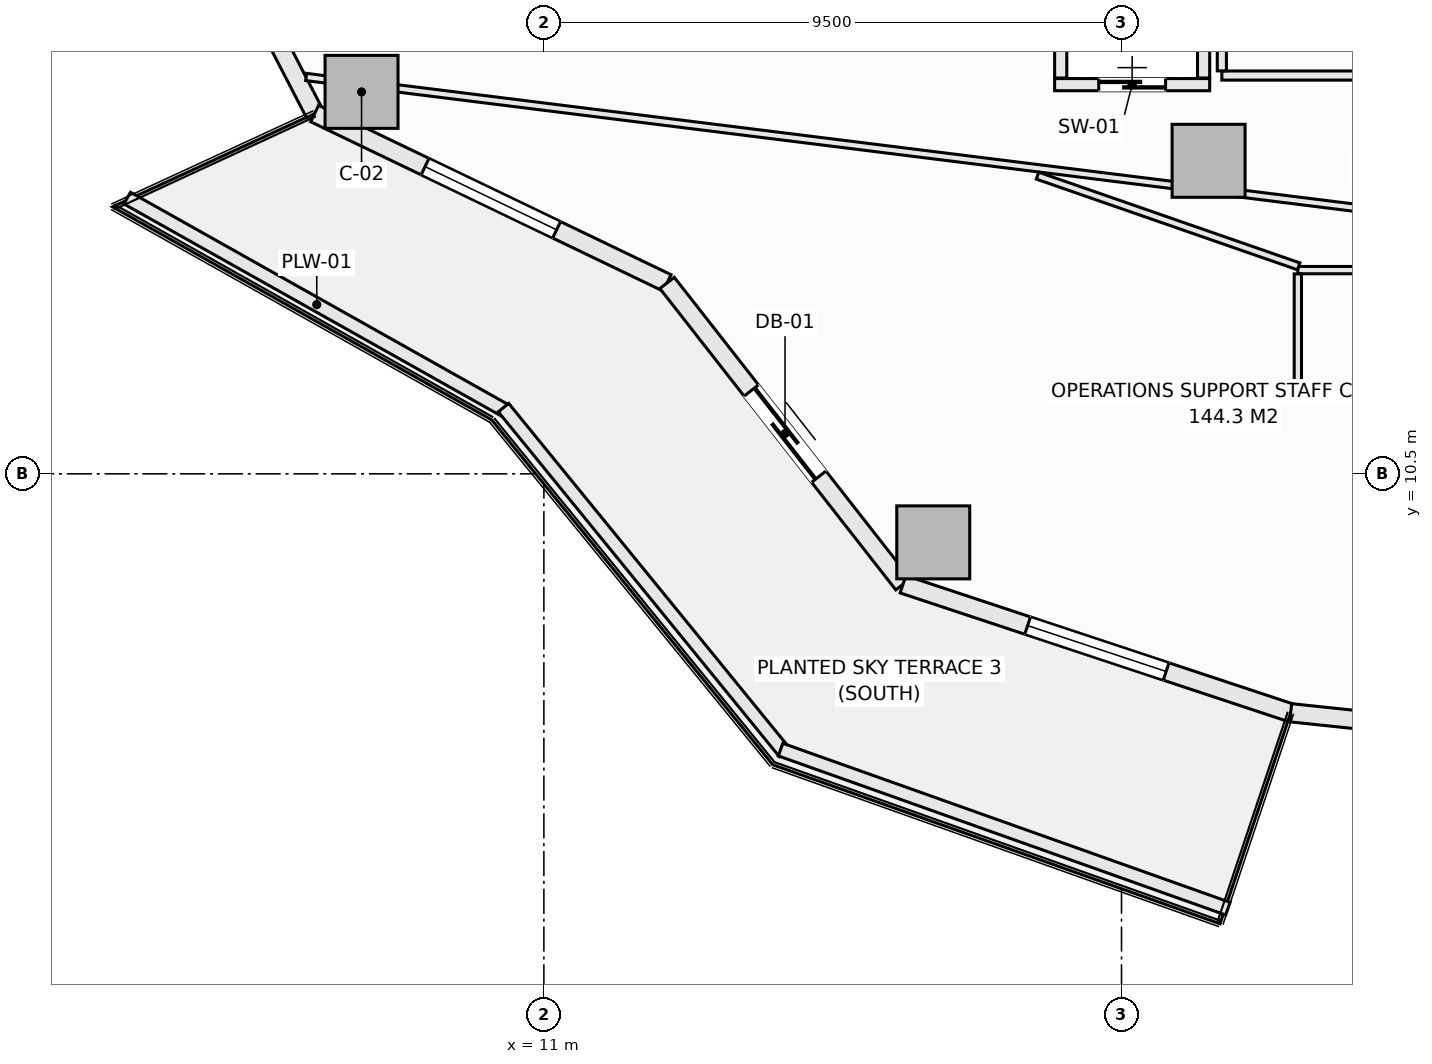
"""IFC4 building model, lengths in metres.
Left out: names, types, materials, properties, quantities, classifications, styles, units other than length and angle.
Written with IfcOpenShell. Run it as: python <this file> out.ifc"""

import sys

from ifc_helpers import new_model, si_unit, direction, frame, frame_2d, origin, origin_2d, place, context, subcontext, project, spatial, rectangle, extrude, element, fill, save


model = new_model("IFC4")
c1 = context("Model", 3, precision=1e-05, world=origin(), true_north=direction((0.0, 1.0)))
c2 = subcontext(c1, "Body", "Model", "MODEL_VIEW")
j1 = project(units=[si_unit("LENGTHUNIT", "METRE"), si_unit("PLANEANGLEUNIT", "RADIAN")], contexts=[c1])
p1 = place(None, origin())
s1 = spatial("IfcSite", under=j1, at=p1, CompositionType="ELEMENT")
p2 = place(p1, origin())
s2 = spatial("IfcBuilding", under=s1, at=p2, CompositionType="ELEMENT")
p3 = place(p2, frame((0.0, 0.0, 84.25)))
s3 = spatial("IfcBuildingStorey", under=s2, at=p3, CompositionType="ELEMENT", Elevation=84.25)
for number, where, z_axis, x_axis in (
    (1, (8.001, 16.781, -0.28), (0.0, 0.0, 1.0), (1.0, 0.0, 0.0)),
    (2, (17.404, 9.373, -0.28), (0.0, 0.0, 1.0), (1.0, 0.0, 0.0)),
    (3, (21.932, 15.648, -0.28), (0.0, 0.0, 1.0), (1.0, 0.0, 0.0)),
):
    element("IfcColumn", number, at=place(p3, frame(where, z_axis=z_axis, x_axis=x_axis)), inside=s3, PredefinedType="COLUMN", context=c2, shape_type="SweptSolid", body=[
        extrude(rectangle(XDim=1.2, YDim=1.2, at=origin_2d()), origin(), (0.0, 0.0, 1.0), 3.85),
    ])
p4 = place(p3, frame((4.588, 21.526, 0.0), z_axis=(0.0, 0.0, 1.0), x_axis=(0.459800981414, -0.888021991558, 0.0)))
e4 = element("IfcWall", 4, at=p4, inside=s3, PredefinedType="SOLIDWALL", context=c2, shape_type="SweptSolid", body=[
    extrude(rectangle(XDim=5.744, YDim=0.3, at=frame_2d((2.872, 0.0))), origin(), (0.0, 0.0, 1.0), 3.093),
])
p5 = place(p4, frame((1.672, 0.0, 0.85)))
e5 = element("IfcOpeningElement", 5, at=p5, cuts=e4, PredefinedType="OPENING", context=c2, shape_type="SweptSolid", body=[
    extrude(rectangle(XDim=2.4, YDim=1.9, at=frame_2d((1.2, 0.95))), frame((0.0, 0.16, 0.0), z_axis=(0.0, -1.0, 0.0), x_axis=(1.0, 0.0, 0.0)), (0.0, 0.0, 1.0), 0.32),
])
p6 = place(p3, frame((7.229, 16.425, 0.0), z_axis=(0.0, 0.0, 1.0), x_axis=(0.901354747727, -0.433081538224, 0.0)))
e6 = element("IfcWall", 6, at=p6, inside=s3, PredefinedType="SOLIDWALL", context=c2, shape_type="SweptSolid", body=[
    extrude(rectangle(XDim=6.431, YDim=0.3, at=frame_2d((3.215, 0.0))), origin(), (0.0, 0.0, 1.0), 3.093),
])
p7 = place(p6, frame((2.015, 0.0, 0.85)))
e7 = element("IfcOpeningElement", 7, at=p7, cuts=e6, PredefinedType="OPENING", context=c2, shape_type="SweptSolid", body=[
    extrude(rectangle(XDim=2.4, YDim=1.9, at=frame_2d((1.2, 0.95))), frame((0.0, 0.16, 0.0), z_axis=(0.0, -1.0, 0.0), x_axis=(1.0, 0.0, 0.0)), (0.0, 0.0, 1.0), 0.32),
])
p8 = place(p3, frame((13.026, 13.64, 0.0), z_axis=(0.0, 0.0, 1.0), x_axis=(0.616434798832, -0.78740595552, 0.0)))
e8 = element("IfcWall", 8, at=p8, inside=s3, PredefinedType="SOLIDWALL", context=c2, shape_type="SweptSolid", body=[
    extrude(rectangle(XDim=6.294, YDim=0.3, at=frame_2d((3.147, 0.0))), origin(), (0.0, 0.0, 1.0), 3.093),
])
p9 = place(p8, frame((2.247, 0.0, 0.0)))
e9 = element("IfcOpeningElement", 9, at=p9, cuts=e8, PredefinedType="OPENING", context=c2, shape_type="SweptSolid", body=[
    extrude(rectangle(XDim=1.8, YDim=2.25, at=frame_2d((0.9, 1.125))), frame((0.0, 0.16, 0.0), z_axis=(0.0, -1.0, 0.0), x_axis=(1.0, 0.0, 0.0)), (0.0, 0.0, 1.0), 0.32),
])
p10 = place(p3, frame((16.906, 8.684, 0.0), z_axis=(0.0, 0.0, 1.0), x_axis=(0.949245153629, -0.314537181127, 0.0)))
e10 = element("IfcWall", 10, at=p10, inside=s3, PredefinedType="SOLIDWALL", context=c2, shape_type="SweptSolid", body=[
    extrude(rectangle(XDim=6.717, YDim=0.3, at=frame_2d((3.358, 0.0))), origin(), (0.0, 0.0, 1.0), 3.093),
])
p11 = place(p10, frame((2.159, 0.0, 0.85)))
e11 = element("IfcOpeningElement", 11, at=p11, cuts=e10, PredefinedType="OPENING", context=c2, shape_type="SweptSolid", body=[
    extrude(rectangle(XDim=2.4, YDim=1.9, at=frame_2d((1.2, 0.95))), frame((0.0, 0.16, 0.0), z_axis=(0.0, -1.0, 0.0), x_axis=(1.0, 0.0, 0.0)), (0.0, 0.0, 1.0), 0.32),
])
p12 = place(p3, frame((23.282, 6.571, 0.0), z_axis=(0.0, 0.0, 1.0), x_axis=(0.994498840295, -0.104747585419, 0.0)))
e12 = element("IfcWall", 12, at=p12, inside=s3, PredefinedType="SOLIDWALL", context=c2, shape_type="SweptSolid", body=[
    extrude(rectangle(XDim=6.88, YDim=0.3, at=frame_2d((3.44, 0.0))), origin(), (0.0, 0.0, 1.0), 3.093),
])
p13 = place(p12, frame((2.24, 0.0, 0.85)))
e13 = element("IfcOpeningElement", 13, at=p13, cuts=e12, PredefinedType="OPENING", context=c2, shape_type="SweptSolid", body=[
    extrude(rectangle(XDim=2.4, YDim=1.9, at=frame_2d((1.2, 0.95))), frame((0.0, 0.16, 0.0), z_axis=(0.0, -1.0, 0.0), x_axis=(1.0, 0.0, 0.0)), (0.0, 0.0, 1.0), 0.32),
])
p14 = place(p3, frame((4.147, 15.034, 0.0), z_axis=(0.0, 0.0, 1.0), x_axis=(0.871775109335, -0.489906275468, 0.0)))
e14 = element("IfcWall", 14, at=p14, inside=s3, PredefinedType="PARAPET", context=c2, shape_type="SweptSolid", body=[
    extrude(rectangle(XDim=7.152, YDim=0.22, at=frame_2d((3.576, 0.0))), origin(), (0.0, 0.0, 1.0), 0.52),
])
p15 = place(p3, frame((10.336, 11.589, 0.0), z_axis=(0.0, 0.0, 1.0), x_axis=(0.631819273026, -0.775115737315, 0.0)))
e15 = element("IfcWall", 15, at=p15, inside=s3, PredefinedType="PARAPET", context=c2, shape_type="SweptSolid", body=[
    extrude(rectangle(XDim=7.316, YDim=0.22, at=frame_2d((3.658, 0.0))), origin(), (0.0, 0.0, 1.0), 0.52),
])
p16 = place(p3, frame((14.893, 5.965, 0.0), z_axis=(0.0, 0.0, 1.0), x_axis=(0.942203722205, -0.335040513764, 0.0)))
e16 = element("IfcWall", 16, at=p16, inside=s3, PredefinedType="PARAPET", context=c2, shape_type="SweptSolid", body=[
    extrude(rectangle(XDim=7.807, YDim=0.22, at=frame_2d((3.904, 0.0))), origin(), (0.0, 0.0, 1.0), 0.52),
])
p17 = place(p3, frame((19.4, 16.9, 0.0), z_axis=(0.0, 0.0, 1.0), x_axis=(1.0, 0.0, 0.0)))
e17 = element("IfcWall", 17, at=p17, inside=s3, PredefinedType="SOLIDWALL", context=c2, shape_type="SweptSolid", body=[
    extrude(rectangle(XDim=2.55, YDim=0.2, at=frame_2d((1.275, 0.0))), origin(), (0.0, 0.0, 1.0), 3.57),
])
p18 = place(p17, frame((0.725, 0.0, 0.0)))
e18 = element("IfcOpeningElement", 18, at=p18, cuts=e17, PredefinedType="OPENING", context=c2, shape_type="SweptSolid", body=[
    extrude(rectangle(XDim=1.1, YDim=2.2, at=frame_2d((0.55, 1.1))), frame((0.0, 0.11, 0.0), z_axis=(0.0, -1.0, 0.0), x_axis=(1.0, 0.0, 0.0)), (0.0, 0.0, 1.0), 0.22),
])
for number, where, z_axis, x_axis in (
    (19, (19.5, 17.01, 0.0), (0.0, 0.0, 1.0), (0.0, 1.0, 0.0)),
    (20, (21.85, 17.01, 0.0), (0.0, 0.0, 1.0), (0.0, 1.0, 0.0)),
):
    element("IfcWall", number, at=place(p3, frame(where, z_axis=z_axis, x_axis=x_axis)), inside=s3, PredefinedType="SOLIDWALL", context=c2, shape_type="SweptSolid", body=[
        extrude(rectangle(XDim=2.53, YDim=0.2, at=frame_2d((1.265, 0.0))), origin(), (0.0, 0.0, 1.0), 3.57),
    ])
p19 = place(p3, frame((22.15, 17.05, 0.0), z_axis=(0.0, 0.0, 1.0), x_axis=(1.0, 0.0, 0.0)))
e21 = element("IfcWall", 21, at=p19, inside=s3, PredefinedType="PARTITIONING", context=c2, shape_type="SweptSolid", body=[
    extrude(rectangle(XDim=5.0, YDim=0.15, at=frame_2d((2.5, 0.0))), origin(), (0.0, 0.0, 1.0), 3.57),
])
p20 = place(p3, frame((22.15, 17.127, 0.0), z_axis=(0.0, 0.0, 1.0), x_axis=(0.0, 1.0, 0.0)))
e22 = element("IfcWall", 22, at=p20, inside=s3, PredefinedType="PARTITIONING", context=c2, shape_type="SweptSolid", body=[
    extrude(rectangle(XDim=2.521, YDim=0.15, at=frame_2d((1.26, 0.0))), origin(), (0.0, 0.0, 1.0), 3.57),
])
p21 = place(p3, frame((23.4, 13.85, 0.0), z_axis=(0.0, 0.0, 1.0), x_axis=(1.0, 0.0, 0.0)))
e23 = element("IfcWall", 23, at=p21, inside=s3, PredefinedType="PARTITIONING", context=c2, shape_type="SweptSolid", body=[
    extrude(rectangle(XDim=3.673, YDim=0.12, at=frame_2d((1.836, 0.0))), origin(), (0.0, 0.0, 1.0), 3.57),
])
p22 = place(p3, frame((23.4, 11.75, 0.0), z_axis=(0.0, 0.0, 1.0), x_axis=(1.0, 0.0, 0.0)))
e24 = element("IfcWall", 24, at=p22, inside=s3, PredefinedType="PARTITIONING", context=c2, shape_type="SweptSolid", body=[
    extrude(rectangle(XDim=17.798, YDim=0.12, at=frame_2d((8.899, 0.0))), origin(), (0.0, 0.0, 1.0), 3.57),
])
p23 = place(p22, frame((3.094, 0.0, 0.0)))
e25 = element("IfcOpeningElement", 25, at=p23, cuts=e24, PredefinedType="OPENING", context=c2, shape_type="SweptSolid", body=[
    extrude(rectangle(XDim=0.95, YDim=2.1, at=frame_2d((0.475, 1.05))), frame((0.0, 0.07, 0.0), z_axis=(0.0, -1.0, 0.0), x_axis=(1.0, 0.0, 0.0)), (0.0, 0.0, 1.0), 0.14),
])
p24 = place(p22, frame((11.091, 0.0, 0.0)))
e26 = element("IfcOpeningElement", 26, at=p24, cuts=e24, PredefinedType="OPENING", context=c2, shape_type="SweptSolid", body=[
    extrude(rectangle(XDim=0.95, YDim=2.1, at=frame_2d((0.475, 1.05))), frame((0.0, 0.07, 0.0), z_axis=(0.0, -1.0, 0.0), x_axis=(1.0, 0.0, 0.0)), (0.0, 0.0, 1.0), 0.14),
])
p25 = place(p3, frame((23.4, 11.812, 0.0), z_axis=(0.0, 0.0, 1.0), x_axis=(0.0, 1.0, 0.0)))
e27 = element("IfcWall", 27, at=p25, inside=s3, PredefinedType="PARTITIONING", context=c2, shape_type="SweptSolid", body=[
    extrude(rectangle(XDim=1.976, YDim=0.12, at=frame_2d((0.988, 0.0))), origin(), (0.0, 0.0, 1.0), 3.57),
])
p26 = place(p3, frame((7.089, 17.026, 0.0), z_axis=(0.0, 0.0, 1.0), x_axis=(0.992316064114, -0.123728852337, 0.0)))
e28 = element("IfcWall", 28, at=p26, inside=s3, PredefinedType="PARTITIONING", context=c2, shape_type="SweptSolid", body=[
    extrude(rectangle(XDim=20.138, YDim=0.12, at=frame_2d((10.069, 0.0))), origin(), (0.0, 0.0, 1.0), 3.205),
])
p27 = place(p3, frame((19.119, 15.404, 0.0), z_axis=(0.0, 0.0, 1.0), x_axis=(0.94466257089, -0.32804363606, 0.0)))
e29 = element("IfcWall", 29, at=p27, inside=s3, PredefinedType="PARTITIONING", context=c2, shape_type="SweptSolid", body=[
    extrude(rectangle(XDim=4.547, YDim=0.12, at=frame_2d((2.273, 0.0))), origin(), (0.0, 0.0, 1.0), 3.57),
])
p28 = place(p7, origin())
e30 = element("IfcWindow", 30, at=p28, inside=s3, PartitioningType="SINGLE_PANEL", PredefinedType="WINDOW", context=c2, shape_type="SweptSolid", body=[
    extrude(rectangle(XDim=2.4, YDim=1.9, at=frame_2d((1.2, 0.95))), frame((0.0, 0.03, 0.0), z_axis=(0.0, -1.0, 0.0), x_axis=(1.0, 0.0, 0.0)), (0.0, 0.0, 1.0), 0.06),
])
fill(e7, e30)
p29 = place(p9, frame((1.8, 0.0, 0.0), z_axis=(0.0, 0.0, 1.0), x_axis=(-1.0, 0.0, 0.0)))
e31 = element("IfcDoor", 31, at=p29, inside=s3, OperationType="SLIDING_TO_LEFT", PredefinedType="DOOR", context=c2, shape_type="SweptSolid", body=[
    extrude(rectangle(XDim=1.8, YDim=2.25, at=frame_2d((0.9, 1.125))), frame((0.0, 0.025, 0.0), z_axis=(0.0, -1.0, 0.0), x_axis=(1.0, 0.0, 0.0)), (0.0, 0.0, 1.0), 0.05),
])
fill(e9, e31)
p30 = place(p11, origin())
e32 = element("IfcWindow", 32, at=p30, inside=s3, PartitioningType="SINGLE_PANEL", PredefinedType="WINDOW", context=c2, shape_type="SweptSolid", body=[
    extrude(rectangle(XDim=2.4, YDim=1.9, at=frame_2d((1.2, 0.95))), frame((0.0, 0.03, 0.0), z_axis=(0.0, -1.0, 0.0), x_axis=(1.0, 0.0, 0.0)), (0.0, 0.0, 1.0), 0.06),
])
fill(e11, e32)
p31 = place(p18, origin())
e33 = element("IfcDoor", 33, at=p31, inside=s3, OperationType="SLIDING_TO_LEFT", PredefinedType="DOOR", context=c2, shape_type="SweptSolid", body=[
    extrude(rectangle(XDim=1.1, YDim=2.2, at=frame_2d((0.55, 1.1))), frame((0.0, 0.025, 0.0), z_axis=(0.0, -1.0, 0.0), x_axis=(1.0, 0.0, 0.0)), (0.0, 0.0, 1.0), 0.05),
])
fill(e18, e33)
save(model, sys.argv[1])
